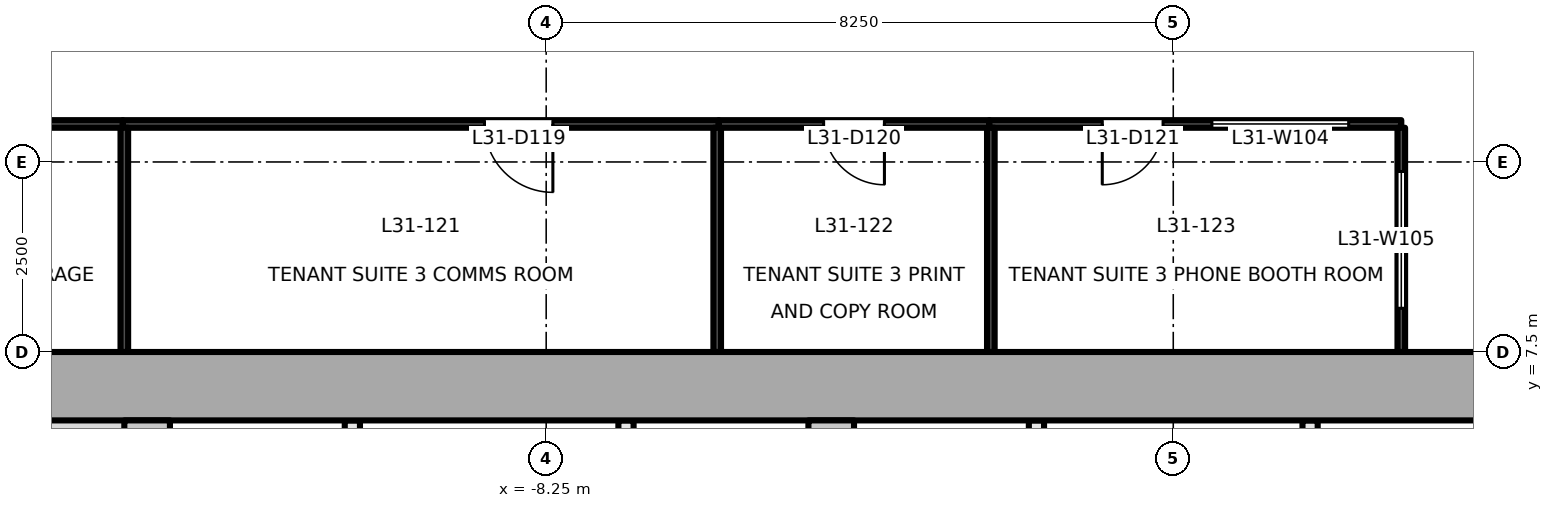
"""IFC4 building model, lengths in metres.
Left out: names, types, materials, properties, quantities, classifications, styles, units other than length and angle.
Written with IfcOpenShell. Run it as: python <this file> out.ifc"""

import sys

from ifc_helpers import new_model, si_unit, direction, frame, frame_2d, origin, place, context, subcontext, project, spatial, rectangle, extrude, element, fill, save


model = new_model("IFC4")
c1 = context("Model", 3, precision=1e-05, world=origin(), true_north=direction((0.0, 1.0)))
c2 = subcontext(c1, "Body", "Model", "MODEL_VIEW")
j1 = project(units=[si_unit("LENGTHUNIT", "METRE"), si_unit("PLANEANGLEUNIT", "RADIAN")], contexts=[c1])
p1 = place(None, origin())
s1 = spatial("IfcSite", under=j1, at=p1, CompositionType="ELEMENT")
p2 = place(p1, origin())
s2 = spatial("IfcBuilding", under=s1, at=p2, CompositionType="ELEMENT")
p3 = place(p2, frame((0.0, 0.0, 138.1)))
s3 = spatial("IfcBuildingStorey", under=s2, at=p3, CompositionType="ELEMENT", Elevation=138.1)
p4 = place(p3, frame((-18.0, 7.05, -0.2), z_axis=(0.0, 0.0, 1.0), x_axis=(1.0, 0.0, 0.0)))
e1 = element("IfcWall", 1, at=p4, inside=s3, PredefinedType="SHEAR", context=c2, shape_type="SweptSolid", body=[
    extrude(rectangle(XDim=36.0, YDim=0.9, at=frame_2d((18.0, 0.0))), origin(), (0.0, 0.0, 1.0), 4.0),
])
for number, where, z_axis, x_axis in (
    (2, (-13.5, -6.6, -0.2), (0.0, 0.0, 1.0), (0.0, 1.0, 0.0)),
    (3, (-4.5, -6.6, -0.2), (0.0, 0.0, 1.0), (0.0, 1.0, 0.0)),
):
    element("IfcWall", number, at=place(p3, frame(where, z_axis=z_axis, x_axis=x_axis)), inside=s3, PredefinedType="SHEAR", context=c2, shape_type="SweptSolid", body=[
        extrude(rectangle(XDim=13.2, YDim=0.6, at=frame_2d((6.6, 0.0))), origin(), (0.0, 0.0, 1.0), 4.0),
    ])
p5 = place(p3, frame((-10.8, -6.6, 0.0), z_axis=(0.0, 0.0, 1.0), x_axis=(0.0, 1.0, 0.0)))
e4 = element("IfcWall", 4, at=p5, inside=s3, PredefinedType="PARTITIONING", context=c2, shape_type="SweptSolid", body=[
    extrude(rectangle(XDim=13.2, YDim=0.2, at=frame_2d((6.6, 0.0))), origin(), (0.0, 0.0, 1.0), 3.8),
])
p6 = place(p5, frame((0.55, 0.0, 0.0)))
e5 = element("IfcOpeningElement", 5, at=p6, cuts=e4, PredefinedType="OPENING", context=c2, shape_type="SweptSolid", body=[
    extrude(rectangle(XDim=0.9, YDim=2.1, at=frame_2d((0.45, 1.05))), frame((0.0, 0.111, 0.0), z_axis=(0.0, -1.0, 0.0), x_axis=(1.0, 0.0, 0.0)), (0.0, 0.0, 1.0), 0.221),
])
p7 = place(p5, frame((2.9, 0.0, 0.0)))
e6 = element("IfcOpeningElement", 6, at=p7, cuts=e4, PredefinedType="OPENING", context=c2, shape_type="SweptSolid", body=[
    extrude(rectangle(XDim=1.2, YDim=2.1, at=frame_2d((0.6, 1.05))), frame((0.0, 0.111, 0.0), z_axis=(0.0, -1.0, 0.0), x_axis=(1.0, 0.0, 0.0)), (0.0, 0.0, 1.0), 0.221),
])
p8 = place(p5, frame((5.7, 0.0, 0.0)))
e7 = element("IfcOpeningElement", 7, at=p8, cuts=e4, PredefinedType="OPENING", context=c2, shape_type="SweptSolid", body=[
    extrude(rectangle(XDim=1.2, YDim=2.1, at=frame_2d((0.6, 1.05))), frame((0.0, 0.111, 0.0), z_axis=(0.0, -1.0, 0.0), x_axis=(1.0, 0.0, 0.0)), (0.0, 0.0, 1.0), 0.221),
])
p9 = place(p5, frame((8.5, 0.0, 0.0)))
e8 = element("IfcOpeningElement", 8, at=p9, cuts=e4, PredefinedType="OPENING", context=c2, shape_type="SweptSolid", body=[
    extrude(rectangle(XDim=1.2, YDim=2.1, at=frame_2d((0.6, 1.05))), frame((0.0, 0.111, 0.0), z_axis=(0.0, -1.0, 0.0), x_axis=(1.0, 0.0, 0.0)), (0.0, 0.0, 1.0), 0.221),
])
p10 = place(p5, frame((11.3, 0.0, 0.0)))
e9 = element("IfcOpeningElement", 9, at=p10, cuts=e4, PredefinedType="OPENING", context=c2, shape_type="SweptSolid", body=[
    extrude(rectangle(XDim=1.2, YDim=2.1, at=frame_2d((0.6, 1.05))), frame((0.0, 0.111, 0.0), z_axis=(0.0, -1.0, 0.0), x_axis=(1.0, 0.0, 0.0)), (0.0, 0.0, 1.0), 0.221),
])
p11 = place(p3, frame((-7.2, -6.6, 0.0), z_axis=(0.0, 0.0, 1.0), x_axis=(0.0, 1.0, 0.0)))
e10 = element("IfcWall", 10, at=p11, inside=s3, PredefinedType="PARTITIONING", context=c2, shape_type="SweptSolid", body=[
    extrude(rectangle(XDim=13.2, YDim=0.2, at=frame_2d((6.6, 0.0))), origin(), (0.0, 0.0, 1.0), 3.8),
])
p12 = place(p11, frame((0.55, 0.0, 0.0)))
e11 = element("IfcOpeningElement", 11, at=p12, cuts=e10, PredefinedType="OPENING", context=c2, shape_type="SweptSolid", body=[
    extrude(rectangle(XDim=0.9, YDim=2.1, at=frame_2d((0.45, 1.05))), frame((0.0, 0.111, 0.0), z_axis=(0.0, -1.0, 0.0), x_axis=(1.0, 0.0, 0.0)), (0.0, 0.0, 1.0), 0.221),
])
p13 = place(p11, frame((2.9, 0.0, 0.0)))
e12 = element("IfcOpeningElement", 12, at=p13, cuts=e10, PredefinedType="OPENING", context=c2, shape_type="SweptSolid", body=[
    extrude(rectangle(XDim=1.2, YDim=2.1, at=frame_2d((0.6, 1.05))), frame((0.0, 0.111, 0.0), z_axis=(0.0, -1.0, 0.0), x_axis=(1.0, 0.0, 0.0)), (0.0, 0.0, 1.0), 0.221),
])
p14 = place(p11, frame((5.7, 0.0, 0.0)))
e13 = element("IfcOpeningElement", 13, at=p14, cuts=e10, PredefinedType="OPENING", context=c2, shape_type="SweptSolid", body=[
    extrude(rectangle(XDim=1.2, YDim=2.1, at=frame_2d((0.6, 1.05))), frame((0.0, 0.111, 0.0), z_axis=(0.0, -1.0, 0.0), x_axis=(1.0, 0.0, 0.0)), (0.0, 0.0, 1.0), 0.221),
])
p15 = place(p11, frame((8.5, 0.0, 0.0)))
e14 = element("IfcOpeningElement", 14, at=p15, cuts=e10, PredefinedType="OPENING", context=c2, shape_type="SweptSolid", body=[
    extrude(rectangle(XDim=1.2, YDim=2.1, at=frame_2d((0.6, 1.05))), frame((0.0, 0.111, 0.0), z_axis=(0.0, -1.0, 0.0), x_axis=(1.0, 0.0, 0.0)), (0.0, 0.0, 1.0), 0.221),
])
p16 = place(p11, frame((11.3, 0.0, 0.0)))
e15 = element("IfcOpeningElement", 15, at=p16, cuts=e10, PredefinedType="OPENING", context=c2, shape_type="SweptSolid", body=[
    extrude(rectangle(XDim=1.2, YDim=2.1, at=frame_2d((0.6, 1.05))), frame((0.0, 0.111, 0.0), z_axis=(0.0, -1.0, 0.0), x_axis=(1.0, 0.0, 0.0)), (0.0, 0.0, 1.0), 0.221),
])
p17 = place(p3, frame((-1.8, -6.6, 0.0), z_axis=(0.0, 0.0, 1.0), x_axis=(0.0, 1.0, 0.0)))
e16 = element("IfcWall", 16, at=p17, inside=s3, PredefinedType="PARTITIONING", context=c2, shape_type="SweptSolid", body=[
    extrude(rectangle(XDim=13.2, YDim=0.2, at=frame_2d((6.6, 0.0))), origin(), (0.0, 0.0, 1.0), 3.8),
])
p18 = place(p17, frame((0.55, 0.0, 0.0)))
e17 = element("IfcOpeningElement", 17, at=p18, cuts=e16, PredefinedType="OPENING", context=c2, shape_type="SweptSolid", body=[
    extrude(rectangle(XDim=0.9, YDim=2.1, at=frame_2d((0.45, 1.05))), frame((0.0, 0.111, 0.0), z_axis=(0.0, -1.0, 0.0), x_axis=(1.0, 0.0, 0.0)), (0.0, 0.0, 1.0), 0.221),
])
p19 = place(p3, frame((1.8, -6.6, 0.0), z_axis=(0.0, 0.0, 1.0), x_axis=(0.0, 1.0, 0.0)))
e18 = element("IfcWall", 18, at=p19, inside=s3, PredefinedType="PARTITIONING", context=c2, shape_type="SweptSolid", body=[
    extrude(rectangle(XDim=13.2, YDim=0.2, at=frame_2d((6.6, 0.0))), origin(), (0.0, 0.0, 1.0), 3.8),
])
p20 = place(p19, frame((0.55, 0.0, 0.0)))
e19 = element("IfcOpeningElement", 19, at=p20, cuts=e18, PredefinedType="OPENING", context=c2, shape_type="SweptSolid", body=[
    extrude(rectangle(XDim=0.9, YDim=2.1, at=frame_2d((0.45, 1.05))), frame((0.0, 0.111, 0.0), z_axis=(0.0, -1.0, 0.0), x_axis=(1.0, 0.0, 0.0)), (0.0, 0.0, 1.0), 0.221),
])
p21 = place(p3, frame((-13.82, 10.5, 0.0), z_axis=(0.0, 0.0, 1.0), x_axis=(-1.0, 0.0, 0.0)))
e20 = element("IfcWall", 20, at=p21, inside=s3, PredefinedType="PARTITIONING", context=c2, shape_type="SweptSolid", body=[
    extrude(rectangle(XDim=4.105, YDim=0.1, at=frame_2d((2.052, 0.0))), origin(), (0.0, 0.0, 1.0), 3.8),
])
p22 = place(p21, frame((1.653, 0.0, 0.0)))
e21 = element("IfcOpeningElement", 21, at=p22, cuts=e20, PredefinedType="OPENING", context=c2, shape_type="SweptSolid", body=[
    extrude(rectangle(XDim=0.8, YDim=2.1, at=frame_2d((0.4, 1.05))), frame((0.0, 0.061, 0.0), z_axis=(0.0, -1.0, 0.0), x_axis=(1.0, 0.0, 0.0)), (0.0, 0.0, 1.0), 0.121),
])
p23 = place(p3, frame((-5.98, 10.5, 0.0), z_axis=(0.0, 0.0, 1.0), x_axis=(-1.0, 0.0, 0.0)))
e22 = element("IfcWall", 22, at=p23, inside=s3, PredefinedType="PARTITIONING", context=c2, shape_type="SweptSolid", body=[
    extrude(rectangle(XDim=7.84, YDim=0.1, at=frame_2d((3.92, 0.0))), origin(), (0.0, 0.0, 1.0), 3.5),
])
p24 = place(p23, frame((2.182, 0.0, 0.0)))
e23 = element("IfcOpeningElement", 23, at=p24, cuts=e22, PredefinedType="OPENING", context=c2, shape_type="SweptSolid", body=[
    extrude(rectangle(XDim=0.9, YDim=2.1, at=frame_2d((0.45, 1.05))), frame((0.0, 0.061, 0.0), z_axis=(0.0, -1.0, 0.0), x_axis=(1.0, 0.0, 0.0)), (0.0, 0.0, 1.0), 0.121),
])
p25 = place(p3, frame((-2.42, 10.5, 0.0), z_axis=(0.0, 0.0, 1.0), x_axis=(-1.0, 0.0, 0.0)))
e24 = element("IfcWall", 24, at=p25, inside=s3, PredefinedType="PARTITIONING", context=c2, shape_type="SweptSolid", body=[
    extrude(rectangle(XDim=3.56, YDim=0.1, at=frame_2d((1.78, 0.0))), origin(), (0.0, 0.0, 1.0), 3.5),
])
p26 = place(p25, frame((1.38, 0.0, 0.0)))
e25 = element("IfcOpeningElement", 25, at=p26, cuts=e24, PredefinedType="OPENING", context=c2, shape_type="SweptSolid", body=[
    extrude(rectangle(XDim=0.8, YDim=2.1, at=frame_2d((0.4, 1.05))), frame((0.0, 0.061, 0.0), z_axis=(0.0, -1.0, 0.0), x_axis=(1.0, 0.0, 0.0)), (0.0, 0.0, 1.0), 0.121),
])
p27 = place(p3, frame((3.0, 10.5, 0.0), z_axis=(0.0, 0.0, 1.0), x_axis=(-1.0, 0.0, 0.0)))
e26 = element("IfcWall", 26, at=p27, inside=s3, PredefinedType="PARTITIONING", context=c2, shape_type="SweptSolid", body=[
    extrude(rectangle(XDim=5.42, YDim=0.1, at=frame_2d((2.71, 0.0))), origin(), (0.0, 0.0, 1.0), 3.5),
])
p28 = place(p27, frame((3.134, 0.0, 0.0)))
e27 = element("IfcOpeningElement", 27, at=p28, cuts=e26, PredefinedType="OPENING", context=c2, shape_type="SweptSolid", body=[
    extrude(rectangle(XDim=0.8, YDim=2.1, at=frame_2d((0.4, 1.05))), frame((0.0, 0.061, 0.0), z_axis=(0.0, -1.0, 0.0), x_axis=(1.0, 0.0, 0.0)), (0.0, 0.0, 1.0), 0.121),
])
p29 = place(p27, frame((0.692, 0.0, 0.9)))
e28 = element("IfcOpeningElement", 28, at=p29, cuts=e26, PredefinedType="OPENING", context=c2, shape_type="SweptSolid", body=[
    extrude(rectangle(XDim=1.8, YDim=1.2, at=frame_2d((0.9, 0.6))), frame((0.0, 0.061, 0.0), z_axis=(0.0, -1.0, 0.0), x_axis=(1.0, 0.0, 0.0)), (0.0, 0.0, 1.0), 0.121),
])
p30 = place(p3, frame((3.0, 7.5, 0.0), z_axis=(0.0, 0.0, 1.0), x_axis=(0.0, 1.0, 0.0)))
e29 = element("IfcWall", 29, at=p30, inside=s3, PredefinedType="PARTITIONING", context=c2, shape_type="SweptSolid", body=[
    extrude(rectangle(XDim=2.95, YDim=0.1, at=frame_2d((1.475, 0.0))), origin(), (0.0, 0.0, 1.0), 3.8),
])
p31 = place(p30, frame((0.575, 0.0, 0.9)))
e30 = element("IfcOpeningElement", 30, at=p31, cuts=e29, PredefinedType="OPENING", context=c2, shape_type="SweptSolid", body=[
    extrude(rectangle(XDim=1.8, YDim=1.2, at=frame_2d((0.9, 0.6))), frame((0.0, 0.061, 0.0), z_axis=(0.0, -1.0, 0.0), x_axis=(1.0, 0.0, 0.0)), (0.0, 0.0, 1.0), 0.121),
])
for number, where, z_axis, x_axis in (
    (31, (-13.8, 10.45, 0.0), (0.0, 0.0, 1.0), (0.0, -1.0, 0.0)),
    (32, (-6.0, 10.45, 0.0), (0.0, 0.0, 1.0), (0.0, -1.0, 0.0)),
    (33, (-2.4, 10.45, 0.0), (0.0, 0.0, 1.0), (0.0, -1.0, 0.0)),
):
    element("IfcWall", number, at=place(p3, frame(where, z_axis=z_axis, x_axis=x_axis)), inside=s3, PredefinedType="PARTITIONING", context=c2, shape_type="SweptSolid", body=[
        extrude(rectangle(XDim=2.95, YDim=0.1, at=frame_2d((1.475, 0.0))), origin(), (0.0, 0.0, 1.0), 3.8),
    ])
p32 = place(p24, origin())
e34 = element("IfcDoor", 34, at=p32, inside=s3, OperationType="SINGLE_SWING_LEFT", PredefinedType="DOOR", context=c2, shape_type="SweptSolid", body=[
    extrude(rectangle(XDim=0.9, YDim=2.1, at=frame_2d((0.45, 1.05))), frame((0.0, 0.025, 0.0), z_axis=(0.0, -1.0, 0.0), x_axis=(1.0, 0.0, 0.0)), (0.0, 0.0, 1.0), 0.05),
])
fill(e23, e34)
p33 = place(p26, origin())
e35 = element("IfcDoor", 35, at=p33, inside=s3, OperationType="SINGLE_SWING_LEFT", PredefinedType="DOOR", context=c2, shape_type="SweptSolid", body=[
    extrude(rectangle(XDim=0.8, YDim=2.1, at=frame_2d((0.4, 1.05))), frame((0.0, 0.025, 0.0), z_axis=(0.0, -1.0, 0.0), x_axis=(1.0, 0.0, 0.0)), (0.0, 0.0, 1.0), 0.05),
])
fill(e25, e35)
p34 = place(p28, origin())
e36 = element("IfcDoor", 36, at=p34, inside=s3, OperationType="SINGLE_SWING_RIGHT", PredefinedType="DOOR", context=c2, shape_type="SweptSolid", body=[
    extrude(rectangle(XDim=0.8, YDim=2.1, at=frame_2d((0.4, 1.05))), frame((0.0, 0.025, 0.0), z_axis=(0.0, -1.0, 0.0), x_axis=(1.0, 0.0, 0.0)), (0.0, 0.0, 1.0), 0.05),
])
fill(e27, e36)
p35 = place(p29, origin())
e37 = element("IfcWindow", 37, at=p35, inside=s3, PartitioningType="SINGLE_PANEL", PredefinedType="WINDOW", context=c2, shape_type="SweptSolid", body=[
    extrude(rectangle(XDim=1.8, YDim=1.2, at=frame_2d((0.9, 0.6))), frame((0.0, 0.03, 0.0), z_axis=(0.0, -1.0, 0.0), x_axis=(1.0, 0.0, 0.0)), (0.0, 0.0, 1.0), 0.06),
])
fill(e28, e37)
p36 = place(p31, origin())
e38 = element("IfcWindow", 38, at=p36, inside=s3, PartitioningType="SINGLE_PANEL", PredefinedType="WINDOW", context=c2, shape_type="SweptSolid", body=[
    extrude(rectangle(XDim=1.8, YDim=1.2, at=frame_2d((0.9, 0.6))), frame((0.0, 0.03, 0.0), z_axis=(0.0, -1.0, 0.0), x_axis=(1.0, 0.0, 0.0)), (0.0, 0.0, 1.0), 0.06),
])
fill(e30, e38)
save(model, sys.argv[1])
